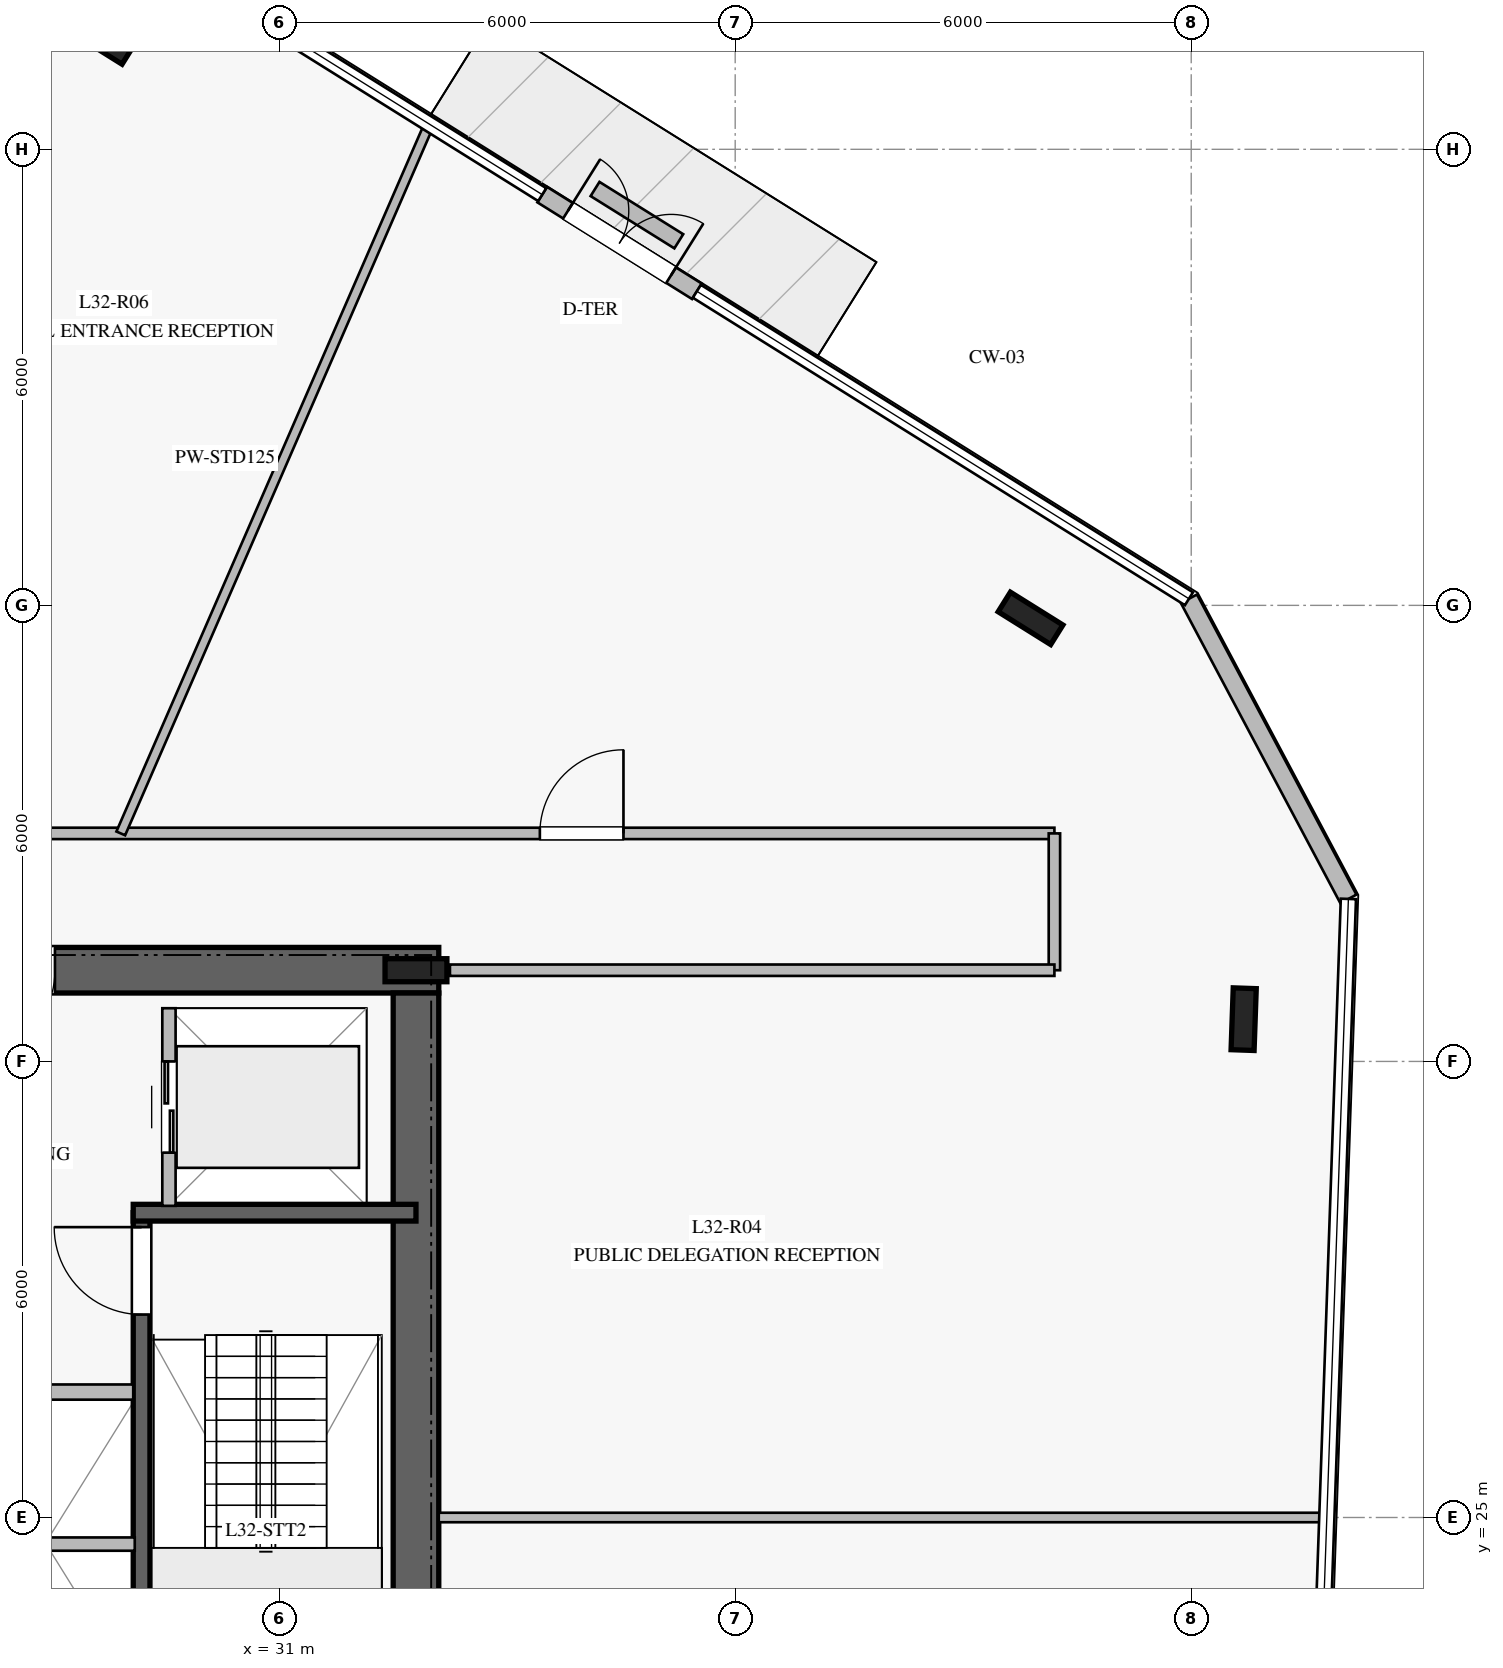
"""IFC4 building model, lengths in metres.
Left out: names, types, materials, properties, quantities, classifications, styles, units other than length and angle.
Written with IfcOpenShell. Run it as: python <this file> out.ifc"""

import sys

from ifc_helpers import new_model, si_unit, direction, frame, frame_2d, origin, origin_2d, place, context, subcontext, project, spatial, rectangle, i_section, extrude, element, fill, save


model = new_model("IFC4")
c1 = context("Model", 3, precision=1e-05, world=origin(), true_north=direction((0.0, 1.0)))
c2 = subcontext(c1, "Body", "Model", "MODEL_VIEW")
j1 = project(units=[si_unit("LENGTHUNIT", "METRE"), si_unit("PLANEANGLEUNIT", "RADIAN")], contexts=[c1])
p1 = place(None, origin())
s1 = spatial("IfcSite", under=j1, at=p1, CompositionType="ELEMENT")
p2 = place(p1, origin())
s2 = spatial("IfcBuilding", under=s1, at=p2, CompositionType="ELEMENT")
p3 = place(p2, frame((0.0, 0.0, 134.4)))
s3 = spatial("IfcBuildingStorey", under=s2, at=p3, CompositionType="ELEMENT", Elevation=134.4)
p4 = place(p3, frame((33.1, 32.2, 0.0), z_axis=(0.0, 0.0, 1.0), x_axis=(-1.0, 0.0, 0.0)))
e1 = element("IfcWall", 1, at=p4, inside=s3, PredefinedType="SHEAR", context=c2, shape_type="SweptSolid", body=[
    extrude(rectangle(XDim=16.2, YDim=0.6, at=frame_2d((8.1, 0.0))), origin(), (0.0, 0.0, 1.0), 3.76),
])
p5 = place(p4, frame((5.05, 0.0, 0.0)))
e2 = element("IfcOpeningElement", 2, at=p5, cuts=e1, PredefinedType="OPENING", context=c2, shape_type="SweptSolid", body=[
    extrude(rectangle(XDim=1.2, YDim=2.25, at=frame_2d((0.6, 1.125))), frame((0.0, 0.31, 0.0), z_axis=(0.0, -1.0, 0.0), x_axis=(1.0, 0.0, 0.0)), (0.0, 0.0, 1.0), 0.62),
])
p6 = place(p4, frame((11.85, 0.0, 0.0)))
e3 = element("IfcOpeningElement", 3, at=p6, cuts=e1, PredefinedType="OPENING", context=c2, shape_type="SweptSolid", body=[
    extrude(rectangle(XDim=1.1, YDim=2.2, at=frame_2d((0.55, 1.1))), frame((0.0, 0.31, 0.0), z_axis=(0.0, -1.0, 0.0), x_axis=(1.0, 0.0, 0.0)), (0.0, 0.0, 1.0), 0.62),
])
p7 = place(p4, frame((9.875, 0.0, 0.0)))
e4 = element("IfcOpeningElement", 4, at=p7, cuts=e1, PredefinedType="OPENING", context=c2, shape_type="SweptSolid", body=[
    extrude(rectangle(XDim=1.1, YDim=2.2, at=frame_2d((0.55, 1.1))), frame((0.0, 0.31, 0.0), z_axis=(0.0, -1.0, 0.0), x_axis=(1.0, 0.0, 0.0)), (0.0, 0.0, 1.0), 0.62),
])
p8 = place(p4, frame((7.9, 0.0, 0.0)))
e5 = element("IfcOpeningElement", 5, at=p8, cuts=e1, PredefinedType="OPENING", context=c2, shape_type="SweptSolid", body=[
    extrude(rectangle(XDim=1.1, YDim=2.2, at=frame_2d((0.55, 1.1))), frame((0.0, 0.31, 0.0), z_axis=(0.0, -1.0, 0.0), x_axis=(1.0, 0.0, 0.0)), (0.0, 0.0, 1.0), 0.62),
])
p9 = place(p3, frame((32.8, 18.1, 0.0), z_axis=(0.0, 0.0, 1.0), x_axis=(0.0, 1.0, 0.0)))
e6 = element("IfcWall", 6, at=p9, inside=s3, PredefinedType="SHEAR", context=c2, shape_type="SweptSolid", body=[
    extrude(rectangle(XDim=13.8, YDim=0.6, at=frame_2d((6.9, 0.0))), origin(), (0.0, 0.0, 1.0), 3.76),
])
p10 = place(p3, frame((32.8, 32.2, 0.0), z_axis=(0.0, 0.0, 1.0), x_axis=(1.0, 0.0, 0.0)))
e7 = element("IfcColumn", 7, at=p10, inside=s3, PredefinedType="COLUMN", context=c2, shape_type="SweptSolid", body=[
    extrude(i_section(OverallWidth=0.303, OverallDepth=0.814, WebThickness=0.021, FlangeThickness=0.04, at=origin_2d()), origin(), (0.0, 0.0, 1.0), 4.0),
])
p11 = place(p3, frame((29.19, 21.79, 0.0), z_axis=(0.0, 0.0, 1.0), x_axis=(0.0, 1.0, 0.0)))
e8 = element("IfcWall", 8, at=p11, inside=s3, PredefinedType="SOLIDWALL", context=c2, shape_type="SweptSolid", body=[
    extrude(rectangle(XDim=7.22, YDim=0.22, at=frame_2d((3.61, 0.0))), origin(), (0.0, 0.0, 1.0), 3.76),
])
p12 = place(p11, frame((5.88, 0.0, 0.0)))
e9 = element("IfcOpeningElement", 9, at=p12, cuts=e8, PredefinedType="OPENING", context=c2, shape_type="SweptSolid", body=[
    extrude(rectangle(XDim=1.15, YDim=2.2, at=frame_2d((0.575, 1.1))), frame((0.0, 0.12, 0.0), z_axis=(0.0, -1.0, 0.0), x_axis=(1.0, 0.0, 0.0)), (0.0, 0.0, 1.0), 0.24),
])
p13 = place(p3, frame((29.08, 29.01, 0.0), z_axis=(0.0, 0.0, 1.0), x_axis=(1.0, 0.0, 0.0)))
e10 = element("IfcWall", 10, at=p13, inside=s3, PredefinedType="SOLIDWALL", context=c2, shape_type="SweptSolid", body=[
    extrude(rectangle(XDim=3.72, YDim=0.22, at=frame_2d((1.86, 0.0))), origin(), (0.0, 0.0, 1.0), 3.76),
])
for number, where, z_axis, x_axis in (
    (11, (40.886, 36.829, 0.0), (0.0, 0.0, 1.0), (-0.848, 0.53, 0.0)),
    (12, (28.668, 44.464, 0.0), (0.0, 0.0, 1.0), (-0.848, 0.53, 0.0)),
    (13, (43.69, 31.556, 0.0), (0.0, 0.0, 1.0), (0.035, 0.999, 0.0)),
):
    element("IfcColumn", number, at=place(p3, frame(where, z_axis=z_axis, x_axis=x_axis)), inside=s3, PredefinedType="COLUMN", context=c2, shape_type="SweptSolid", body=[
        extrude(i_section(OverallWidth=0.303, OverallDepth=0.814, WebThickness=0.021, FlangeThickness=0.04, at=origin_2d()), origin(), (0.0, 0.0, 1.0), 4.0),
    ])
p14 = place(p3, frame((36.496, 41.132, 0.0), z_axis=(0.0, 0.0, 1.0), x_axis=(-0.847998304005, 0.529998940003, 0.0)))
e14 = element("IfcWall", 14, at=p14, inside=s3, PredefinedType="STANDARD", context=c2, shape_type="SweptSolid", body=[
    extrude(rectangle(XDim=2.4, YDim=0.24, at=frame_2d((1.2, 0.0))), origin(), (0.0, 0.0, 1.0), 3.76),
])
p15 = place(p14, frame((0.4, 0.0, 0.0)))
e15 = element("IfcOpeningElement", 15, at=p15, cuts=e14, PredefinedType="OPENING", context=c2, shape_type="SweptSolid", body=[
    extrude(rectangle(XDim=1.6, YDim=2.25, at=frame_2d((0.8, 1.125))), frame((0.0, 0.13, 0.0), z_axis=(0.0, -1.0, 0.0), x_axis=(1.0, 0.0, 0.0)), (0.0, 0.0, 1.0), 0.26),
])
p16 = place(p3, frame((45.068, 33.138, 0.0), z_axis=(0.0, 0.0, 1.0), x_axis=(-0.46919913514, 0.883092391307, 0.0)))
e16 = element("IfcWall", 16, at=p16, inside=s3, PredefinedType="STANDARD", context=c2, shape_type="SweptSolid", body=[
    extrude(rectangle(XDim=4.472, YDim=0.24, at=frame_2d((2.236, 0.0))), origin(), (0.0, 0.0, 1.0), 3.76),
])
p17 = place(p3, frame((36.258, 41.79, 0.0), z_axis=(0.0, 0.0, 1.0), x_axis=(-0.848272680747, 0.52955968417, 0.0)))
e17 = element("IfcWall", 17, at=p17, inside=s3, PredefinedType="USERDEFINED", context=c2, shape_type="SweptSolid", body=[
    extrude(rectangle(XDim=1.299, YDim=0.22, at=frame_2d((0.649, 0.0))), origin(), (0.0, 0.0, 1.0), 0.4),
])
p18 = place(p3, frame((25.7, 26.65, 0.0), z_axis=(0.0, 0.0, 1.0), x_axis=(1.0, 0.0, 0.0)))
e18 = element("IfcWall", 18, at=p18, inside=s3, PredefinedType="PARTITIONING", context=c2, shape_type="SweptSolid", body=[
    extrude(rectangle(XDim=3.38, YDim=0.2, at=frame_2d((1.69, 0.0))), origin(), (0.0, 0.0, 1.0), 3.76),
])
p19 = place(p3, frame((26.75, 24.65, 0.0), z_axis=(0.0, 0.0, 1.0), x_axis=(1.0, 0.0, 0.0)))
e19 = element("IfcWall", 19, at=p19, inside=s3, PredefinedType="PARTITIONING", context=c2, shape_type="SweptSolid", body=[
    extrude(rectangle(XDim=2.35, YDim=0.175, at=frame_2d((1.175, 0.0))), origin(), (0.0, 0.0, 1.0), 3.76),
])
p20 = place(p3, frame((29.55, 29.1, 0.0), z_axis=(0.0, 0.0, 1.0), x_axis=(0.0, 1.0, 0.0)))
e20 = element("IfcWall", 20, at=p20, inside=s3, PredefinedType="PARTITIONING", context=c2, shape_type="SweptSolid", body=[
    extrude(rectangle(XDim=2.6, YDim=0.175, at=frame_2d((1.3, 0.0))), origin(), (0.0, 0.0, 1.0), 3.76),
])
p21 = place(p20, frame((0.7, 0.0, 0.0)))
e21 = element("IfcOpeningElement", 21, at=p21, cuts=e20, PredefinedType="OPENING", context=c2, shape_type="SweptSolid", body=[
    extrude(rectangle(XDim=1.2, YDim=2.2, at=frame_2d((0.6, 1.1))), frame((0.0, 0.098, 0.0), z_axis=(0.0, -1.0, 0.0), x_axis=(1.0, 0.0, 0.0)), (0.0, 0.0, 1.0), 0.195),
])
p22 = place(p3, frame((25.95, 34.0, 0.0), z_axis=(0.0, 0.0, 1.0), x_axis=(1.0, 0.0, 0.0)))
e22 = element("IfcWall", 22, at=p22, inside=s3, PredefinedType="PARTITIONING", context=c2, shape_type="SweptSolid", body=[
    extrude(rectangle(XDim=15.25, YDim=0.15, at=frame_2d((7.625, 0.0))), origin(), (0.0, 0.0, 1.0), 3.21),
])
p23 = place(p22, frame((8.48, 0.0, 0.0)))
e23 = element("IfcOpeningElement", 23, at=p23, cuts=e22, PredefinedType="OPENING", context=c2, shape_type="SweptSolid", body=[
    extrude(rectangle(XDim=1.1, YDim=2.2, at=frame_2d((0.55, 1.1))), frame((0.0, 0.085, 0.0), z_axis=(0.0, -1.0, 0.0), x_axis=(1.0, 0.0, 0.0)), (0.0, 0.0, 1.0), 0.17),
])
p24 = place(p3, frame((41.2, 34.0, 0.0), z_axis=(0.0, 0.0, 1.0), x_axis=(0.0, -1.0, 0.0)))
e24 = element("IfcWall", 24, at=p24, inside=s3, PredefinedType="PARTITIONING", context=c2, shape_type="SweptSolid", body=[
    extrude(rectangle(XDim=1.8, YDim=0.15, at=frame_2d((0.9, 0.0))), origin(), (0.0, 0.0, 1.0), 3.76),
])
p25 = place(p3, frame((41.2, 32.2, 0.0), z_axis=(0.0, 0.0, 1.0), x_axis=(-1.0, 0.0, 0.0)))
e25 = element("IfcWall", 25, at=p25, inside=s3, PredefinedType="PARTITIONING", context=c2, shape_type="SweptSolid", body=[
    extrude(rectangle(XDim=7.953, YDim=0.15, at=frame_2d((3.977, 0.0))), origin(), (0.0, 0.0, 1.0), 3.21),
])
p26 = place(p3, frame((28.916, 34.0, 0.0), z_axis=(0.0, 0.0, 1.0), x_axis=(0.398858798929, 0.917012354615, 0.0)))
e26 = element("IfcWall", 26, at=p26, inside=s3, PredefinedType="PARTITIONING", context=c2, shape_type="SweptSolid", body=[
    extrude(rectangle(XDim=10.159, YDim=0.125, at=frame_2d((5.08, 0.0))), origin(), (0.0, 0.0, 1.0), 3.16),
])
p27 = place(p3, frame((33.1, 25.0, 0.0), z_axis=(0.0, 0.0, 1.0), x_axis=(1.0, 0.0, 0.0)))
e27 = element("IfcWall", 27, at=p27, inside=s3, PredefinedType="PARTITIONING", context=c2, shape_type="SweptSolid", body=[
    extrude(rectangle(XDim=11.667, YDim=0.125, at=frame_2d((5.833, 0.0))), origin(), (0.0, 0.0, 1.0), 3.16),
])
p28 = place(p15, frame((1.6, 0.0, 0.0), z_axis=(0.0, 0.0, 1.0), x_axis=(-1.0, 0.0, 0.0)))
e28 = element("IfcDoor", 28, at=p28, inside=s3, OperationType="DOUBLE_DOOR_SINGLE_SWING", PredefinedType="DOOR", context=c2, shape_type="SweptSolid", body=[
    extrude(rectangle(XDim=1.6, YDim=2.25, at=frame_2d((0.8, 1.125))), frame((0.0, 0.025, 0.0), z_axis=(0.0, -1.0, 0.0), x_axis=(1.0, 0.0, 0.0)), (0.0, 0.0, 1.0), 0.05),
])
fill(e15, e28)
p29 = place(p12, origin())
e29 = element("IfcDoor", 29, at=p29, inside=s3, OperationType="SINGLE_SWING_RIGHT", PredefinedType="DOOR", context=c2, shape_type="SweptSolid", body=[
    extrude(rectangle(XDim=1.15, YDim=2.2, at=frame_2d((0.575, 1.1))), frame((0.0, 0.025, 0.0), z_axis=(0.0, -1.0, 0.0), x_axis=(1.0, 0.0, 0.0)), (0.0, 0.0, 1.0), 0.05),
])
fill(e9, e29)
p30 = place(p5, origin())
e30 = element("IfcDoor", 30, at=p30, inside=s3, OperationType="SINGLE_SWING_RIGHT", PredefinedType="DOOR", context=c2, shape_type="SweptSolid", body=[
    extrude(rectangle(XDim=1.2, YDim=2.25, at=frame_2d((0.6, 1.125))), frame((0.0, 0.025, 0.0), z_axis=(0.0, -1.0, 0.0), x_axis=(1.0, 0.0, 0.0)), (0.0, 0.0, 1.0), 0.05),
])
fill(e2, e30)
p31 = place(p21, origin())
e31 = element("IfcDoor", 31, at=p31, inside=s3, OperationType="DOUBLE_DOOR_SLIDING", PredefinedType="DOOR", context=c2, shape_type="SweptSolid", body=[
    extrude(rectangle(XDim=1.2, YDim=2.2, at=frame_2d((0.6, 1.1))), frame((0.0, 0.025, 0.0), z_axis=(0.0, -1.0, 0.0), x_axis=(1.0, 0.0, 0.0)), (0.0, 0.0, 1.0), 0.05),
])
fill(e21, e31)
p32 = place(p23, origin())
e32 = element("IfcDoor", 32, at=p32, inside=s3, OperationType="SINGLE_SWING_RIGHT", PredefinedType="DOOR", context=c2, shape_type="SweptSolid", body=[
    extrude(rectangle(XDim=1.1, YDim=2.2, at=frame_2d((0.55, 1.1))), frame((0.0, 0.025, 0.0), z_axis=(0.0, -1.0, 0.0), x_axis=(1.0, 0.0, 0.0)), (0.0, 0.0, 1.0), 0.05),
])
fill(e23, e32)
save(model, sys.argv[1])
